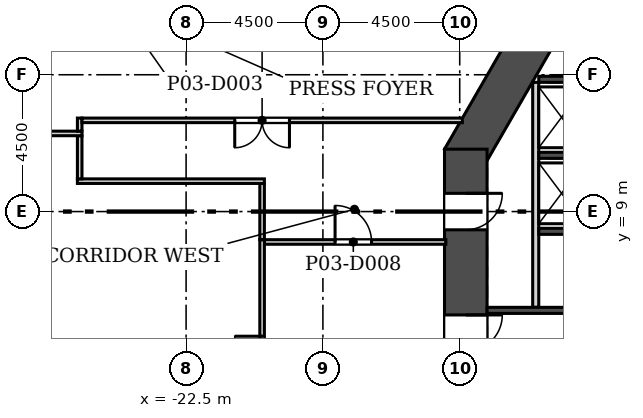
"""IFC4 building model, lengths in metres.
Left out: names, types, materials, properties, quantities, classifications, styles, units other than length and angle.
Written with IfcOpenShell. Run it as: python <this file> out.ifc"""

import sys

from ifc_helpers import new_model, si_unit, direction, frame, frame_2d, origin, place, context, subcontext, project, spatial, rectangle, extrude, element, fill, save


model = new_model("IFC4")
c1 = context("Model", 3, precision=1e-05, world=origin(), true_north=direction((0.0, 1.0)))
c2 = subcontext(c1, "Body", "Model", "MODEL_VIEW")
j1 = project(units=[si_unit("LENGTHUNIT", "METRE"), si_unit("PLANEANGLEUNIT", "RADIAN")], contexts=[c1])
p1 = place(None, origin())
s1 = spatial("IfcSite", under=j1, at=p1, CompositionType="ELEMENT")
p2 = place(p1, origin())
s2 = spatial("IfcBuilding", under=s1, at=p2, CompositionType="ELEMENT")
p3 = place(p2, frame((0.0, 0.0, 20.0)))
s3 = spatial("IfcBuildingStorey", under=s2, at=p3, CompositionType="ELEMENT", Elevation=20.0)
p4 = place(p3, frame((-8.805, 18.65, 0.0), z_axis=(0.0, 0.0, 1.0), x_axis=(-0.50000187635, -0.866024320471, 0.0)))
e1 = element("IfcWall", 1, at=p4, inside=s3, PredefinedType="SHEAR", context=c2, shape_type="SweptSolid", body=[
    extrude(rectangle(XDim=9.177, YDim=1.4, at=frame_2d((4.588, 0.0))), origin(), (0.0, 0.0, 1.0), 5.0),
])
p5 = place(p3, frame((-13.3, 11.052, 0.0), z_axis=(0.0, 0.0, 1.0), x_axis=(0.0, -1.0, 0.0)))
e2 = element("IfcWall", 2, at=p5, inside=s3, PredefinedType="SHEAR", context=c2, shape_type="SweptSolid", body=[
    extrude(rectangle(XDim=10.202, YDim=1.4, at=frame_2d((5.101, 0.0))), origin(), (0.0, 0.0, 1.0), 5.0),
])
p6 = place(p5, frame((5.453, 0.0, 0.0)))
e3 = element("IfcOpeningElement", 3, at=p6, cuts=e2, PredefinedType="OPENING", context=c2, shape_type="SweptSolid", body=[
    extrude(rectangle(XDim=1.2, YDim=2.1, at=frame_2d((0.6, 1.05))), frame((0.0, 0.71, 0.0), z_axis=(0.0, -1.0, 0.0), x_axis=(1.0, 0.0, 0.0)), (0.0, 0.0, 1.0), 1.42),
])
p7 = place(p5, frame((1.453, 0.0, 0.0)))
e4 = element("IfcOpeningElement", 4, at=p7, cuts=e2, PredefinedType="OPENING", context=c2, shape_type="SweptSolid", body=[
    extrude(rectangle(XDim=1.2, YDim=2.1, at=frame_2d((0.6, 1.05))), frame((0.0, 0.71, 0.0), z_axis=(0.0, -1.0, 0.0), x_axis=(1.0, 0.0, 0.0)), (0.0, 0.0, 1.0), 1.42),
])
p8 = place(p3, frame((-4.853, 74.393, 0.0), z_axis=(0.0, 0.0, 1.0), x_axis=(-0.49999894854, -0.866026010844, 0.0)))
e5 = element("IfcWall", 5, at=p8, inside=s3, PredefinedType="SOLIDWALL", context=c2, shape_type="SweptSolid", body=[
    extrude(rectangle(XDim=76.0, YDim=0.34, at=frame_2d((38.0, 0.0))), origin(), (0.0, 0.0, 1.0), 3.0),
])
p9 = place(p8, frame((1.058, 0.0, 0.9)))
e6 = element("IfcOpeningElement", 6, at=p9, cuts=e5, PredefinedType="OPENING", context=c2, shape_type="SweptSolid", body=[
    extrude(rectangle(XDim=1.885, YDim=1.9, at=frame_2d((0.942, 0.95))), frame((0.0, 0.18, 0.0), z_axis=(0.0, -1.0, 0.0), x_axis=(1.0, 0.0, 0.0)), (0.0, 0.0, 1.0), 0.36),
])
p10 = place(p8, frame((4.058, 0.0, 0.9)))
e7 = element("IfcOpeningElement", 7, at=p10, cuts=e5, PredefinedType="OPENING", context=c2, shape_type="SweptSolid", body=[
    extrude(rectangle(XDim=1.885, YDim=1.9, at=frame_2d((0.942, 0.95))), frame((0.0, 0.18, 0.0), z_axis=(0.0, -1.0, 0.0), x_axis=(1.0, 0.0, 0.0)), (0.0, 0.0, 1.0), 0.36),
])
p11 = place(p8, frame((7.058, 0.0, 0.9)))
e8 = element("IfcOpeningElement", 8, at=p11, cuts=e5, PredefinedType="OPENING", context=c2, shape_type="SweptSolid", body=[
    extrude(rectangle(XDim=1.885, YDim=1.9, at=frame_2d((0.942, 0.95))), frame((0.0, 0.18, 0.0), z_axis=(0.0, -1.0, 0.0), x_axis=(1.0, 0.0, 0.0)), (0.0, 0.0, 1.0), 0.36),
])
p12 = place(p8, frame((10.058, 0.0, 0.9)))
e9 = element("IfcOpeningElement", 9, at=p12, cuts=e5, PredefinedType="OPENING", context=c2, shape_type="SweptSolid", body=[
    extrude(rectangle(XDim=1.885, YDim=1.9, at=frame_2d((0.942, 0.95))), frame((0.0, 0.18, 0.0), z_axis=(0.0, -1.0, 0.0), x_axis=(1.0, 0.0, 0.0)), (0.0, 0.0, 1.0), 0.36),
])
p13 = place(p8, frame((13.058, 0.0, 0.9)))
e10 = element("IfcOpeningElement", 10, at=p13, cuts=e5, PredefinedType="OPENING", context=c2, shape_type="SweptSolid", body=[
    extrude(rectangle(XDim=1.885, YDim=1.9, at=frame_2d((0.942, 0.95))), frame((0.0, 0.18, 0.0), z_axis=(0.0, -1.0, 0.0), x_axis=(1.0, 0.0, 0.0)), (0.0, 0.0, 1.0), 0.36),
])
p14 = place(p8, frame((16.058, 0.0, 0.9)))
e11 = element("IfcOpeningElement", 11, at=p14, cuts=e5, PredefinedType="OPENING", context=c2, shape_type="SweptSolid", body=[
    extrude(rectangle(XDim=1.885, YDim=1.9, at=frame_2d((0.942, 0.95))), frame((0.0, 0.18, 0.0), z_axis=(0.0, -1.0, 0.0), x_axis=(1.0, 0.0, 0.0)), (0.0, 0.0, 1.0), 0.36),
])
p15 = place(p8, frame((19.058, 0.0, 0.9)))
e12 = element("IfcOpeningElement", 12, at=p15, cuts=e5, PredefinedType="OPENING", context=c2, shape_type="SweptSolid", body=[
    extrude(rectangle(XDim=1.885, YDim=1.9, at=frame_2d((0.942, 0.95))), frame((0.0, 0.18, 0.0), z_axis=(0.0, -1.0, 0.0), x_axis=(1.0, 0.0, 0.0)), (0.0, 0.0, 1.0), 0.36),
])
p16 = place(p8, frame((22.058, 0.0, 0.9)))
e13 = element("IfcOpeningElement", 13, at=p16, cuts=e5, PredefinedType="OPENING", context=c2, shape_type="SweptSolid", body=[
    extrude(rectangle(XDim=1.885, YDim=1.9, at=frame_2d((0.942, 0.95))), frame((0.0, 0.18, 0.0), z_axis=(0.0, -1.0, 0.0), x_axis=(1.0, 0.0, 0.0)), (0.0, 0.0, 1.0), 0.36),
])
p17 = place(p8, frame((25.058, 0.0, 0.9)))
e14 = element("IfcOpeningElement", 14, at=p17, cuts=e5, PredefinedType="OPENING", context=c2, shape_type="SweptSolid", body=[
    extrude(rectangle(XDim=1.885, YDim=1.9, at=frame_2d((0.942, 0.95))), frame((0.0, 0.18, 0.0), z_axis=(0.0, -1.0, 0.0), x_axis=(1.0, 0.0, 0.0)), (0.0, 0.0, 1.0), 0.36),
])
p18 = place(p8, frame((28.058, 0.0, 0.9)))
e15 = element("IfcOpeningElement", 15, at=p18, cuts=e5, PredefinedType="OPENING", context=c2, shape_type="SweptSolid", body=[
    extrude(rectangle(XDim=1.885, YDim=1.9, at=frame_2d((0.942, 0.95))), frame((0.0, 0.18, 0.0), z_axis=(0.0, -1.0, 0.0), x_axis=(1.0, 0.0, 0.0)), (0.0, 0.0, 1.0), 0.36),
])
p19 = place(p8, frame((31.058, 0.0, 0.9)))
e16 = element("IfcOpeningElement", 16, at=p19, cuts=e5, PredefinedType="OPENING", context=c2, shape_type="SweptSolid", body=[
    extrude(rectangle(XDim=1.885, YDim=1.9, at=frame_2d((0.942, 0.95))), frame((0.0, 0.18, 0.0), z_axis=(0.0, -1.0, 0.0), x_axis=(1.0, 0.0, 0.0)), (0.0, 0.0, 1.0), 0.36),
])
p20 = place(p8, frame((34.058, 0.0, 0.9)))
e17 = element("IfcOpeningElement", 17, at=p20, cuts=e5, PredefinedType="OPENING", context=c2, shape_type="SweptSolid", body=[
    extrude(rectangle(XDim=1.885, YDim=1.9, at=frame_2d((0.942, 0.95))), frame((0.0, 0.18, 0.0), z_axis=(0.0, -1.0, 0.0), x_axis=(1.0, 0.0, 0.0)), (0.0, 0.0, 1.0), 0.36),
])
p21 = place(p8, frame((37.058, 0.0, 0.9)))
e18 = element("IfcOpeningElement", 18, at=p21, cuts=e5, PredefinedType="OPENING", context=c2, shape_type="SweptSolid", body=[
    extrude(rectangle(XDim=1.885, YDim=1.9, at=frame_2d((0.942, 0.95))), frame((0.0, 0.18, 0.0), z_axis=(0.0, -1.0, 0.0), x_axis=(1.0, 0.0, 0.0)), (0.0, 0.0, 1.0), 0.36),
])
p22 = place(p8, frame((40.058, 0.0, 0.9)))
e19 = element("IfcOpeningElement", 19, at=p22, cuts=e5, PredefinedType="OPENING", context=c2, shape_type="SweptSolid", body=[
    extrude(rectangle(XDim=1.885, YDim=1.9, at=frame_2d((0.942, 0.95))), frame((0.0, 0.18, 0.0), z_axis=(0.0, -1.0, 0.0), x_axis=(1.0, 0.0, 0.0)), (0.0, 0.0, 1.0), 0.36),
])
p23 = place(p8, frame((43.058, 0.0, 0.9)))
e20 = element("IfcOpeningElement", 20, at=p23, cuts=e5, PredefinedType="OPENING", context=c2, shape_type="SweptSolid", body=[
    extrude(rectangle(XDim=1.885, YDim=1.9, at=frame_2d((0.942, 0.95))), frame((0.0, 0.18, 0.0), z_axis=(0.0, -1.0, 0.0), x_axis=(1.0, 0.0, 0.0)), (0.0, 0.0, 1.0), 0.36),
])
p24 = place(p8, frame((46.058, 0.0, 0.9)))
e21 = element("IfcOpeningElement", 21, at=p24, cuts=e5, PredefinedType="OPENING", context=c2, shape_type="SweptSolid", body=[
    extrude(rectangle(XDim=1.885, YDim=1.9, at=frame_2d((0.942, 0.95))), frame((0.0, 0.18, 0.0), z_axis=(0.0, -1.0, 0.0), x_axis=(1.0, 0.0, 0.0)), (0.0, 0.0, 1.0), 0.36),
])
p25 = place(p8, frame((49.058, 0.0, 0.9)))
e22 = element("IfcOpeningElement", 22, at=p25, cuts=e5, PredefinedType="OPENING", context=c2, shape_type="SweptSolid", body=[
    extrude(rectangle(XDim=1.885, YDim=1.9, at=frame_2d((0.942, 0.95))), frame((0.0, 0.18, 0.0), z_axis=(0.0, -1.0, 0.0), x_axis=(1.0, 0.0, 0.0)), (0.0, 0.0, 1.0), 0.36),
])
p26 = place(p8, frame((52.058, 0.0, 0.9)))
e23 = element("IfcOpeningElement", 23, at=p26, cuts=e5, PredefinedType="OPENING", context=c2, shape_type="SweptSolid", body=[
    extrude(rectangle(XDim=1.885, YDim=1.9, at=frame_2d((0.942, 0.95))), frame((0.0, 0.18, 0.0), z_axis=(0.0, -1.0, 0.0), x_axis=(1.0, 0.0, 0.0)), (0.0, 0.0, 1.0), 0.36),
])
p27 = place(p8, frame((55.058, 0.0, 0.9)))
e24 = element("IfcOpeningElement", 24, at=p27, cuts=e5, PredefinedType="OPENING", context=c2, shape_type="SweptSolid", body=[
    extrude(rectangle(XDim=1.885, YDim=1.9, at=frame_2d((0.942, 0.95))), frame((0.0, 0.18, 0.0), z_axis=(0.0, -1.0, 0.0), x_axis=(1.0, 0.0, 0.0)), (0.0, 0.0, 1.0), 0.36),
])
p28 = place(p8, frame((58.058, 0.0, 0.9)))
e25 = element("IfcOpeningElement", 25, at=p28, cuts=e5, PredefinedType="OPENING", context=c2, shape_type="SweptSolid", body=[
    extrude(rectangle(XDim=1.885, YDim=1.9, at=frame_2d((0.942, 0.95))), frame((0.0, 0.18, 0.0), z_axis=(0.0, -1.0, 0.0), x_axis=(1.0, 0.0, 0.0)), (0.0, 0.0, 1.0), 0.36),
])
p29 = place(p8, frame((61.058, 0.0, 0.9)))
e26 = element("IfcOpeningElement", 26, at=p29, cuts=e5, PredefinedType="OPENING", context=c2, shape_type="SweptSolid", body=[
    extrude(rectangle(XDim=1.885, YDim=1.9, at=frame_2d((0.942, 0.95))), frame((0.0, 0.18, 0.0), z_axis=(0.0, -1.0, 0.0), x_axis=(1.0, 0.0, 0.0)), (0.0, 0.0, 1.0), 0.36),
])
p30 = place(p8, frame((64.058, 0.0, 0.9)))
e27 = element("IfcOpeningElement", 27, at=p30, cuts=e5, PredefinedType="OPENING", context=c2, shape_type="SweptSolid", body=[
    extrude(rectangle(XDim=1.885, YDim=1.9, at=frame_2d((0.942, 0.95))), frame((0.0, 0.18, 0.0), z_axis=(0.0, -1.0, 0.0), x_axis=(1.0, 0.0, 0.0)), (0.0, 0.0, 1.0), 0.36),
])
p31 = place(p8, frame((67.058, 0.0, 0.9)))
e28 = element("IfcOpeningElement", 28, at=p31, cuts=e5, PredefinedType="OPENING", context=c2, shape_type="SweptSolid", body=[
    extrude(rectangle(XDim=1.885, YDim=1.9, at=frame_2d((0.942, 0.95))), frame((0.0, 0.18, 0.0), z_axis=(0.0, -1.0, 0.0), x_axis=(1.0, 0.0, 0.0)), (0.0, 0.0, 1.0), 0.36),
])
p32 = place(p8, frame((70.058, 0.0, 0.9)))
e29 = element("IfcOpeningElement", 29, at=p32, cuts=e5, PredefinedType="OPENING", context=c2, shape_type="SweptSolid", body=[
    extrude(rectangle(XDim=1.885, YDim=1.9, at=frame_2d((0.942, 0.95))), frame((0.0, 0.18, 0.0), z_axis=(0.0, -1.0, 0.0), x_axis=(1.0, 0.0, 0.0)), (0.0, 0.0, 1.0), 0.36),
])
p33 = place(p8, frame((73.058, 0.0, 0.9)))
e30 = element("IfcOpeningElement", 30, at=p33, cuts=e5, PredefinedType="OPENING", context=c2, shape_type="SweptSolid", body=[
    extrude(rectangle(XDim=1.885, YDim=1.9, at=frame_2d((0.942, 0.95))), frame((0.0, 0.18, 0.0), z_axis=(0.0, -1.0, 0.0), x_axis=(1.0, 0.0, 0.0)), (0.0, 0.0, 1.0), 0.36),
])
p34 = place(p3, frame((-11.0, 5.85, 0.0), z_axis=(0.0, 0.0, 1.0), x_axis=(0.0, 1.0, 0.0)))
e31 = element("IfcWall", 31, at=p34, inside=s3, PredefinedType="SOLIDWALL", context=c2, shape_type="SweptSolid", body=[
    extrude(rectangle(XDim=7.4, YDim=0.2, at=frame_2d((3.7, 0.0))), origin(), (0.0, 0.0, 1.0), 3.0),
])
p35 = place(p3, frame((-10.9, 8.35, -0.3), z_axis=(0.0, 0.0, 1.0), x_axis=(1.0, 0.0, 0.0)))
e32 = element("IfcWall", 32, at=p35, inside=s3, PredefinedType="SOLIDWALL", context=c2, shape_type="SweptSolid", body=[
    extrude(rectangle(XDim=2.0, YDim=0.2, at=frame_2d((1.0, 0.0))), origin(), (0.0, 0.0, 1.0), 3.3),
])
p36 = place(p3, frame((-12.6, 5.75, -0.3), z_axis=(0.0, 0.0, 1.0), x_axis=(1.0, 0.0, 0.0)))
e33 = element("IfcWall", 33, at=p36, inside=s3, PredefinedType="SOLIDWALL", context=c2, shape_type="SweptSolid", body=[
    extrude(rectangle(XDim=11.4, YDim=0.2, at=frame_2d((5.7, 0.0))), origin(), (0.0, 0.0, 1.0), 3.3),
])
for number, where, z_axis, x_axis in (
    (34, (-10.9, 10.85, -0.3), (0.0, 0.0, 1.0), (1.0, 0.0, 0.0)),
    (35, (-10.9, 13.35, -0.3), (0.0, 0.0, 1.0), (1.0, 0.0, 0.0)),
):
    element("IfcWall", number, at=place(p3, frame(where, z_axis=z_axis, x_axis=x_axis)), inside=s3, PredefinedType="SOLIDWALL", context=c2, shape_type="SweptSolid", body=[
        extrude(rectangle(XDim=2.0, YDim=0.2, at=frame_2d((1.0, 0.0))), origin(), (0.0, 0.0, 1.0), 3.3),
    ])
p37 = place(p3, frame((-19.925, 8.0, 0.0), z_axis=(0.0, 0.0, 1.0), x_axis=(1.0, 0.0, 0.0)))
e36 = element("IfcWall", 36, at=p37, inside=s3, PredefinedType="PARTITIONING", context=c2, shape_type="SweptSolid", body=[
    extrude(rectangle(XDim=5.97, YDim=0.15, at=frame_2d((2.985, 0.0))), origin(), (0.0, 0.0, 1.0), 3.0),
])
p38 = place(p37, frame((2.325, 0.0, 0.0)))
e37 = element("IfcOpeningElement", 37, at=p38, cuts=e36, PredefinedType="OPENING", context=c2, shape_type="SweptSolid", body=[
    extrude(rectangle(XDim=1.2, YDim=2.1, at=frame_2d((0.6, 1.05))), frame((0.0, 0.085, 0.0), z_axis=(0.0, -1.0, 0.0), x_axis=(1.0, 0.0, 0.0)), (0.0, 0.0, 1.0), 0.17),
])
p39 = place(p3, frame((-20.0, 8.075, 0.0), z_axis=(0.0, 0.0, 1.0), x_axis=(0.0, -1.0, 0.0)))
e38 = element("IfcWall", 38, at=p39, inside=s3, PredefinedType="PARTITIONING", context=c2, shape_type="SweptSolid", body=[
    extrude(rectangle(XDim=7.78, YDim=0.15, at=frame_2d((3.89, 0.0))), origin(), (0.0, 0.0, 1.0), 3.0),
])
p40 = place(p39, frame((3.175, 0.0, 0.0)))
e39 = element("IfcOpeningElement", 39, at=p40, cuts=e38, PredefinedType="OPENING", context=c2, shape_type="SweptSolid", body=[
    extrude(rectangle(XDim=1.8, YDim=2.1, at=frame_2d((0.9, 1.05))), frame((0.0, 0.085, 0.0), z_axis=(0.0, -1.0, 0.0), x_axis=(1.0, 0.0, 0.0)), (0.0, 0.0, 1.0), 0.17),
])
p41 = place(p3, frame((-20.0, 9.925, 0.0), z_axis=(0.0, 0.0, 1.0), x_axis=(0.0, -1.0, 0.0)))
e40 = element("IfcWall", 40, at=p41, inside=s3, PredefinedType="PARTITIONING", context=c2, shape_type="SweptSolid", body=[
    extrude(rectangle(XDim=1.85, YDim=0.15, at=frame_2d((0.925, 0.0))), origin(), (0.0, 0.0, 1.0), 3.0),
])
p42 = place(p3, frame((-26.075, 10.0, 0.0), z_axis=(0.0, 0.0, 1.0), x_axis=(1.0, 0.0, 0.0)))
e41 = element("IfcWall", 41, at=p42, inside=s3, PredefinedType="PARTITIONING", context=c2, shape_type="SweptSolid", body=[
    extrude(rectangle(XDim=6.15, YDim=0.15, at=frame_2d((3.075, 0.0))), origin(), (0.0, 0.0, 1.0), 3.0),
])
p43 = place(p3, frame((-26.0, 11.495, 0.0), z_axis=(0.0, 0.0, 1.0), x_axis=(0.0, -1.0, 0.0)))
e42 = element("IfcWall", 42, at=p43, inside=s3, PredefinedType="PARTITIONING", context=c2, shape_type="SweptSolid", body=[
    extrude(rectangle(XDim=1.42, YDim=0.15, at=frame_2d((0.71, 0.0))), origin(), (0.0, 0.0, 1.0), 3.0),
])
p44 = place(p3, frame((-40.968, 11.57, 0.0), z_axis=(0.0, 0.0, 1.0), x_axis=(1.0, 0.0, 0.0)))
e43 = element("IfcWall", 43, at=p44, inside=s3, PredefinedType="PARTITIONING", context=c2, shape_type="SweptSolid", body=[
    extrude(rectangle(XDim=15.043, YDim=0.15, at=frame_2d((7.521, 0.0))), origin(), (0.0, 0.0, 1.0), 3.0),
])
p45 = place(p44, frame((2.068, 0.0, 0.0)))
e44 = element("IfcOpeningElement", 44, at=p45, cuts=e43, PredefinedType="OPENING", context=c2, shape_type="SweptSolid", body=[
    extrude(rectangle(XDim=1.8, YDim=2.1, at=frame_2d((0.9, 1.05))), frame((0.0, 0.085, 0.0), z_axis=(0.0, -1.0, 0.0), x_axis=(1.0, 0.0, 0.0)), (0.0, 0.0, 1.0), 0.17),
])
p46 = place(p3, frame((-26.0, 11.645, 0.0), z_axis=(0.0, 0.0, 1.0), x_axis=(0.0, 1.0, 0.0)))
e45 = element("IfcWall", 45, at=p46, inside=s3, PredefinedType="PARTITIONING", context=c2, shape_type="SweptSolid", body=[
    extrude(rectangle(XDim=0.43, YDim=0.15, at=frame_2d((0.215, 0.0))), origin(), (0.0, 0.0, 1.0), 3.0),
])
p47 = place(p3, frame((-25.925, 12.0, 0.0), z_axis=(0.0, 0.0, 1.0), x_axis=(1.0, 0.0, 0.0)))
e46 = element("IfcWall", 46, at=p47, inside=s3, PredefinedType="PARTITIONING", context=c2, shape_type="SweptSolid", body=[
    extrude(rectangle(XDim=12.512, YDim=0.15, at=frame_2d((6.256, 0.0))), origin(), (0.0, 0.0, 1.0), 3.0),
])
p48 = place(p47, frame((5.025, 0.0, 0.0)))
e47 = element("IfcOpeningElement", 47, at=p48, cuts=e46, PredefinedType="OPENING", context=c2, shape_type="SweptSolid", body=[
    extrude(rectangle(XDim=1.8, YDim=2.1, at=frame_2d((0.9, 1.05))), frame((0.0, 0.085, 0.0), z_axis=(0.0, -1.0, 0.0), x_axis=(1.0, 0.0, 0.0)), (0.0, 0.0, 1.0), 0.17),
])
p49 = place(p3, frame((-26.761, 19.108, 0.0), z_axis=(0.0, 0.0, 1.0), x_axis=(-0.499979843709, -0.866037040711, 0.0)))
e48 = element("IfcWall", 48, at=p49, inside=s3, PredefinedType="SOLIDWALL", context=c2, shape_type="SweptSolid", body=[
    extrude(rectangle(XDim=8.293, YDim=0.25, at=frame_2d((4.146, 0.0))), origin(), (0.0, 0.0, 1.0), 3.0),
])
p50 = place(p6, origin())
e49 = element("IfcDoor", 49, at=p50, inside=s3, OperationType="SINGLE_SWING_LEFT", PredefinedType="DOOR", context=c2, shape_type="SweptSolid", body=[
    extrude(rectangle(XDim=1.2, YDim=2.1, at=frame_2d((0.6, 1.05))), frame((0.0, 0.025, 0.0), z_axis=(0.0, -1.0, 0.0), x_axis=(1.0, 0.0, 0.0)), (0.0, 0.0, 1.0), 0.05),
])
fill(e3, e49)
p51 = place(p7, origin())
e50 = element("IfcDoor", 50, at=p51, inside=s3, OperationType="SINGLE_SWING_LEFT", PredefinedType="DOOR", context=c2, shape_type="SweptSolid", body=[
    extrude(rectangle(XDim=1.2, YDim=2.1, at=frame_2d((0.6, 1.05))), frame((0.0, 0.025, 0.0), z_axis=(0.0, -1.0, 0.0), x_axis=(1.0, 0.0, 0.0)), (0.0, 0.0, 1.0), 0.05),
])
fill(e4, e50)
p52 = place(p38, origin())
e51 = element("IfcDoor", 51, at=p52, inside=s3, OperationType="SINGLE_SWING_LEFT", PredefinedType="DOOR", context=c2, shape_type="SweptSolid", body=[
    extrude(rectangle(XDim=1.2, YDim=2.1, at=frame_2d((0.6, 1.05))), frame((0.0, 0.025, 0.0), z_axis=(0.0, -1.0, 0.0), x_axis=(1.0, 0.0, 0.0)), (0.0, 0.0, 1.0), 0.05),
])
fill(e37, e51)
p53 = place(p48, frame((1.8, 0.0, 0.0), z_axis=(0.0, 0.0, 1.0), x_axis=(-1.0, 0.0, 0.0)))
e52 = element("IfcDoor", 52, at=p53, inside=s3, OperationType="DOUBLE_DOOR_SINGLE_SWING", PredefinedType="DOOR", context=c2, shape_type="SweptSolid", body=[
    extrude(rectangle(XDim=1.8, YDim=2.1, at=frame_2d((0.9, 1.05))), frame((0.0, 0.025, 0.0), z_axis=(0.0, -1.0, 0.0), x_axis=(1.0, 0.0, 0.0)), (0.0, 0.0, 1.0), 0.05),
])
fill(e47, e52)
p54 = place(p40, frame((1.8, 0.0, 0.0), z_axis=(0.0, 0.0, 1.0), x_axis=(-1.0, 0.0, 0.0)))
e53 = element("IfcDoor", 53, at=p54, inside=s3, OperationType="DOUBLE_DOOR_SINGLE_SWING", PredefinedType="DOOR", context=c2, shape_type="SweptSolid", body=[
    extrude(rectangle(XDim=1.8, YDim=2.1, at=frame_2d((0.9, 1.05))), frame((0.0, 0.025, 0.0), z_axis=(0.0, -1.0, 0.0), x_axis=(1.0, 0.0, 0.0)), (0.0, 0.0, 1.0), 0.05),
])
fill(e39, e53)
save(model, sys.argv[1])
